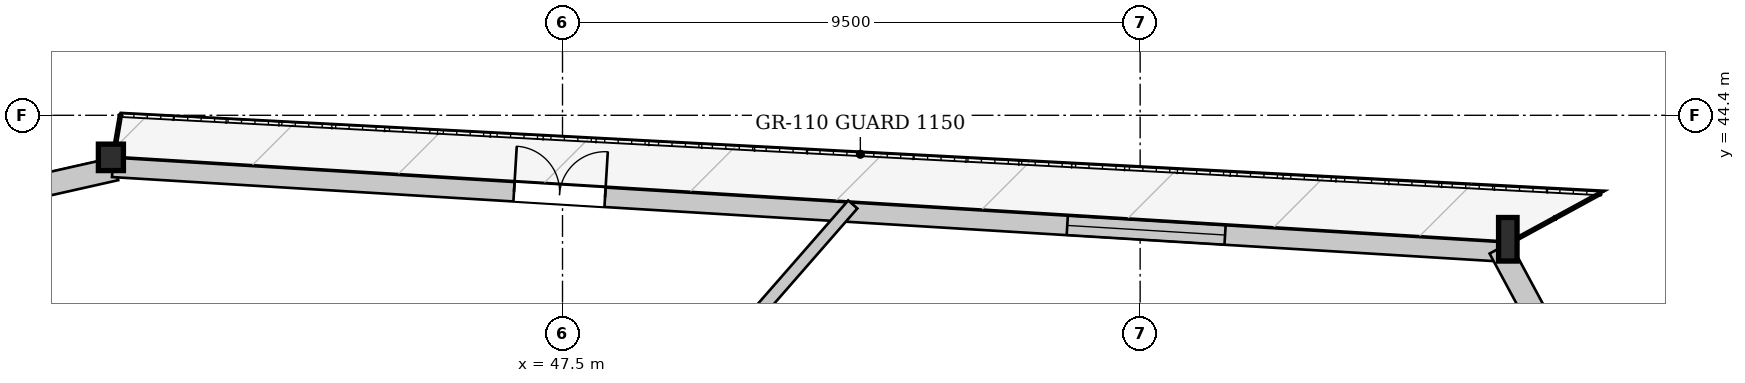
"""IFC4 building model, lengths in metres.
Left out: names, types, materials, properties, quantities, classifications, styles, units other than length and angle.
Written with IfcOpenShell. Run it as: python <this file> out.ifc"""

import sys

from ifc_helpers import new_model, si_unit, direction, frame, frame_2d, origin, origin_2d, place, context, subcontext, project, spatial, rectangle, i_section, extrude, source, transform, mapped, element, fill, save


model = new_model("IFC4")
c1 = context("Model", 3, precision=1e-05, world=origin(), true_north=direction((0.0, 1.0)))
c2 = subcontext(c1, "Body", "Model", "MODEL_VIEW")
j1 = project(units=[si_unit("LENGTHUNIT", "METRE"), si_unit("PLANEANGLEUNIT", "RADIAN")], contexts=[c1])
p1 = place(None, origin())
s1 = spatial("IfcSite", under=j1, at=p1, CompositionType="ELEMENT")
p2 = place(p1, origin())
s2 = spatial("IfcBuilding", under=s1, at=p2, CompositionType="ELEMENT")
p3 = place(p2, frame((0.0, 0.0, 153.7)))
s3 = spatial("IfcBuildingStorey", under=s2, at=p3, CompositionType="ELEMENT", Elevation=153.7)
m1 = source(origin(), c2, "Body", "SweptSolid", [
    extrude(i_section(OverallWidth=0.304, OverallDepth=0.716, WebThickness=0.021, FlangeThickness=0.04, at=origin_2d()), origin(), (0.0, 0.0, 1.0), 3.387),
])
p4 = place(p3, frame((63.081, 42.306, 0.0), z_axis=(-0.020324175047, 0.032288051138, 0.999271939795), x_axis=(-0.846295926314, -0.53271306076, 0.0)))
e1 = element("IfcColumn", 1, at=p4, inside=s3, PredefinedType="COLUMN", context=c2, shape_type="MappedRepresentation", body=[
    mapped(m1, transform((0.0, 0.0, 0.0), x_axis=(1.0, 0.0, 0.0), y_axis=(0.0, 1.0, 0.0), z_axis=(0.0, 0.0, 1.0), scale=1.0)),
])
m2 = source(origin(), c2, "Body", "SweptSolid", [
    extrude(i_section(OverallWidth=0.412, OverallDepth=0.435, WebThickness=0.031, FlangeThickness=0.05, at=origin_2d()), origin(), (0.0, 0.0, 1.0), 3.386),
])
p5 = place(p3, frame((40.11, 43.704, 0.0), z_axis=(-0.022064508815, 0.002667930804, 0.999752989291), x_axis=(-0.120040692713, -0.992768972165, 0.0)))
e2 = element("IfcColumn", 2, at=p5, inside=s3, PredefinedType="COLUMN", context=c2, shape_type="MappedRepresentation", body=[
    mapped(m2, transform((0.0, 0.0, 0.0), x_axis=(1.0, 0.0, 0.0), y_axis=(0.0, 1.0, 0.0), z_axis=(0.0, 0.0, 1.0), scale=1.0)),
])
p6 = place(p3, frame((17.7, 38.464, 0.0), z_axis=(0.0, 0.0, 1.0), x_axis=(0.975581235483, 0.21963891498, 0.0)))
e3 = element("IfcWall", 3, at=p6, inside=s3, PredefinedType="SOLIDWALL", context=c2, shape_type="SweptSolid", body=[
    extrude(rectangle(XDim=23.014, YDim=0.38, at=frame_2d((11.507, 0.0))), origin(), (0.0, 0.0, 1.0), 2.692),
])
p7 = place(p6, frame((5.344, 0.0, 0.322)))
e4 = element("IfcOpeningElement", 4, at=p7, cuts=e3, PredefinedType="OPENING", context=c2, shape_type="SweptSolid", body=[
    extrude(rectangle(XDim=2.2, YDim=2.25, at=frame_2d((1.1, 1.125))), frame((0.0, 0.2, 0.0), z_axis=(0.0, -1.0, 0.0), x_axis=(1.0, 0.0, 0.0)), (0.0, 0.0, 1.0), 0.4),
])
p8 = place(p6, frame((15.47, 0.0, 0.322)))
e5 = element("IfcOpeningElement", 5, at=p8, cuts=e3, PredefinedType="OPENING", context=c2, shape_type="SweptSolid", body=[
    extrude(rectangle(XDim=2.2, YDim=2.25, at=frame_2d((1.1, 1.125))), frame((0.0, 0.2, 0.0), z_axis=(0.0, -1.0, 0.0), x_axis=(1.0, 0.0, 0.0)), (0.0, 0.0, 1.0), 0.4),
])
p9 = place(p3, frame((40.1, 43.544, 0.0), z_axis=(0.0, 0.0, 1.0), x_axis=(0.99815464943, -0.060723107805, 0.0)))
e6 = element("IfcWall", 6, at=p9, inside=s3, PredefinedType="SOLIDWALL", context=c2, shape_type="SweptSolid", body=[
    extrude(rectangle(XDim=23.014, YDim=0.32, at=frame_2d((11.507, 0.0))), origin(), (0.0, 0.0, 1.0), 2.692),
])
p10 = place(p9, frame((6.614, 0.0, 0.0)))
e7 = element("IfcOpeningElement", 7, at=p10, cuts=e6, PredefinedType="OPENING", context=c2, shape_type="SweptSolid", body=[
    extrude(rectangle(XDim=1.5, YDim=2.3, at=frame_2d((0.75, 1.15))), frame((0.0, 0.17, 0.0), z_axis=(0.0, -1.0, 0.0), x_axis=(1.0, 0.0, 0.0)), (0.0, 0.0, 1.0), 0.34),
])
p11 = place(p9, frame((15.73, 0.0, 0.25)))
e8 = element("IfcOpeningElement", 8, at=p11, cuts=e6, PredefinedType="OPENING", context=c2, shape_type="SweptSolid", body=[
    extrude(rectangle(XDim=2.6, YDim=2.35, at=frame_2d((1.3, 1.175))), frame((0.0, 0.17, 0.0), z_axis=(0.0, -1.0, 0.0), x_axis=(1.0, 0.0, 0.0)), (0.0, 0.0, 1.0), 0.34),
])
p12 = place(p3, frame((62.914, 42.216, 0.0), z_axis=(0.0, 0.0, 1.0), x_axis=(0.474144819754, -0.880446869436, 0.0)))
e9 = element("IfcWall", 9, at=p12, inside=s3, PredefinedType="SOLIDWALL", context=c2, shape_type="SweptSolid", body=[
    extrude(rectangle(XDim=3.559, YDim=0.38, at=frame_2d((1.78, 0.0))), origin(), (0.0, 0.0, 1.0), 2.692),
])
p13 = place(p3, frame((46.389, 36.2, 0.0), z_axis=(0.0, 0.0, 1.0), x_axis=(0.658021279413, 0.752999333227, 0.0)))
e10 = element("IfcWall", 10, at=p13, inside=s3, PredefinedType="PARTITIONING", context=c2, shape_type="SweptSolid", body=[
    extrude(rectangle(XDim=8.943, YDim=0.2, at=frame_2d((4.471, 0.0))), origin(), (0.0, 0.0, 1.0), 3.3),
])
m3 = source(origin(), c2, "Body", "SweptSolid", [
    extrude(rectangle(XDim=1.5, YDim=2.3, at=frame_2d((0.75, 1.15))), frame((0.0, 0.025, 0.0), z_axis=(0.0, -1.0, 0.0), x_axis=(1.0, 0.0, 0.0)), (0.0, 0.0, 1.0), 0.05),
])
p14 = place(p10, origin())
e11 = element("IfcDoor", 11, at=p14, inside=s3, OperationType="DOUBLE_DOOR_SINGLE_SWING", PredefinedType="DOOR", context=c2, shape_type="MappedRepresentation", body=[
    mapped(m3, transform((0.0, 0.0, 0.0), x_axis=(1.0, 0.0, 0.0), y_axis=(0.0, 1.0, 0.0), z_axis=(0.0, 0.0, 1.0), scale=1.0)),
])
fill(e7, e11)
m4 = source(origin(), c2, "Body", "SweptSolid", [
    extrude(rectangle(XDim=2.6, YDim=2.35, at=frame_2d((1.3, 1.175))), frame((0.0, 0.03, 0.0), z_axis=(0.0, -1.0, 0.0), x_axis=(1.0, 0.0, 0.0)), (0.0, 0.0, 1.0), 0.06),
])
p15 = place(p11, origin())
e12 = element("IfcWindow", 12, at=p15, inside=s3, PartitioningType="SINGLE_PANEL", PredefinedType="WINDOW", context=c2, shape_type="MappedRepresentation", body=[
    mapped(m4, transform((0.0, 0.0, 0.0), x_axis=(1.0, 0.0, 0.0), y_axis=(0.0, 1.0, 0.0), z_axis=(0.0, 0.0, 1.0), scale=1.0)),
])
fill(e8, e12)
save(model, sys.argv[1])
